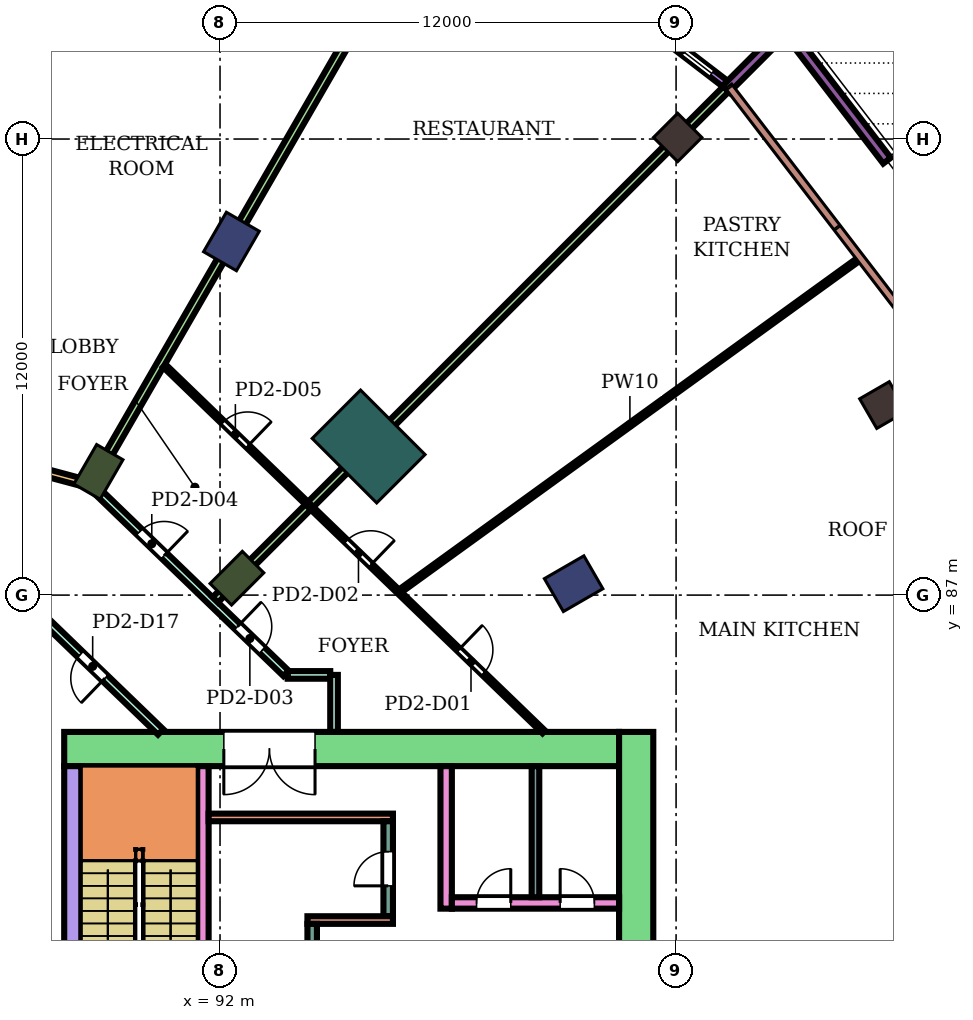
"""IFC4 building model, lengths in metres.
Left out: names, types, materials, properties, quantities, classifications, styles, units other than length and angle.
Written with IfcOpenShell. Run it as: python <this file> out.ifc"""

import sys

from ifc_helpers import new_model, si_unit, direction, frame, frame_2d, origin, origin_2d, place, context, subcontext, project, spatial, rectangle, extrude, element, fill, save


model = new_model("IFC4")
c1 = context("Model", 3, precision=1e-05, world=origin(), true_north=direction((0.0, 1.0)))
c2 = subcontext(c1, "Body", "Model", "MODEL_VIEW")
j1 = project(units=[si_unit("LENGTHUNIT", "METRE"), si_unit("PLANEANGLEUNIT", "RADIAN")], contexts=[c1])
p1 = place(None, origin())
s1 = spatial("IfcSite", under=j1, at=p1, CompositionType="ELEMENT")
p2 = place(p1, origin())
s2 = spatial("IfcBuilding", under=s1, at=p2, CompositionType="ELEMENT")
p3 = place(p2, frame((0.0, 0.0, 12.4)))
s3 = spatial("IfcBuildingStorey", under=s2, at=p3, CompositionType="ELEMENT", Elevation=12.4)
for number, where, z_axis, x_axis in (
    (1, (109.445, 92.0, 0.0), (0.0, 0.0, 1.0), (0.866, 0.5, 0.0)),
    (2, (104.042, 99.042, 0.0), (0.0, 0.0, 1.0), (0.707, 0.707, 0.0)),
):
    element("IfcColumn", number, at=place(p3, frame(where, z_axis=z_axis, x_axis=x_axis)), inside=s3, PredefinedType="COLUMN", context=c2, shape_type="SweptSolid", body=[
        extrude(rectangle(XDim=0.9, YDim=0.9, at=origin_2d()), origin(), (0.0, 0.0, 1.0), 5.4),
    ])
for number, where, z_axis, x_axis in (
    (3, (101.304, 87.3, 0.0), (0.0, 0.0, 1.0), (0.866, 0.5, 0.0)),
    (4, (92.3, 96.304, 0.0), (0.0, 0.0, 1.0), (0.5, 0.866, 0.0)),
):
    element("IfcColumn", number, at=place(p3, frame(where, z_axis=z_axis, x_axis=x_axis)), inside=s3, PredefinedType="COLUMN", context=c2, shape_type="SweptSolid", body=[
        extrude(rectangle(XDim=1.2, YDim=1.0, at=origin_2d()), origin(), (0.0, 0.0, 1.0), 5.4),
    ])
for number, where, z_axis, x_axis in (
    (5, (92.445, 87.445, 0.0), (0.0, 0.0, 1.0), (0.707, 0.707, 0.0)),
    (6, (88.8, 90.242, 0.0), (0.0, 0.0, 1.0), (0.5, 0.866, 0.0)),
):
    element("IfcColumn", number, at=place(p3, frame(where, z_axis=z_axis, x_axis=x_axis)), inside=s3, PredefinedType="COLUMN", context=c2, shape_type="SweptSolid", body=[
        extrude(rectangle(XDim=1.2, YDim=0.8, at=origin_2d()), origin(), (0.0, 0.0, 1.0), 5.4),
    ])
p4 = place(p3, frame((95.91, 90.91, 0.0), z_axis=(0.0, 0.0, 1.0), x_axis=(0.707106781187, 0.707106781187, 0.0)))
e7 = element("IfcColumn", 7, at=p4, inside=s3, PredefinedType="COLUMN", context=c2, shape_type="SweptSolid", body=[
    extrude(rectangle(XDim=1.8, YDim=2.4, at=origin_2d()), origin(), (0.0, 0.0, 1.0), 5.4),
])
p5 = place(p3, frame((87.9, 82.95, 0.0), z_axis=(0.0, 0.0, 1.0), x_axis=(1.0, 0.0, 0.0)))
e8 = element("IfcWall", 8, at=p5, inside=s3, PredefinedType="SHEAR", context=c2, shape_type="SweptSolid", body=[
    extrude(rectangle(XDim=14.6, YDim=0.9, at=frame_2d((7.3, 0.0))), origin(), (0.0, 0.0, 1.0), 4.95),
])
p6 = place(p5, frame((4.2, 0.0, 0.0)))
e9 = element("IfcOpeningElement", 9, at=p6, cuts=e8, PredefinedType="OPENING", context=c2, shape_type="SweptSolid", body=[
    extrude(rectangle(XDim=2.4, YDim=2.4, at=frame_2d((1.2, 1.2))), frame((0.0, 0.46, 0.0), z_axis=(0.0, -1.0, 0.0), x_axis=(1.0, 0.0, 0.0)), (0.0, 0.0, 1.0), 0.92),
])
p7 = place(p3, frame((88.125, 75.0, 0.0), z_axis=(0.0, 0.0, 1.0), x_axis=(0.0, 1.0, 0.0)))
e10 = element("IfcWall", 10, at=p7, inside=s3, PredefinedType="SHEAR", context=c2, shape_type="SweptSolid", body=[
    extrude(rectangle(XDim=7.5, YDim=0.45, at=frame_2d((3.75, 0.0))), origin(), (0.0, 0.0, 1.0), 4.95),
])
p8 = place(p3, frame((102.95, 66.6, 0.0), z_axis=(0.0, 0.0, 1.0), x_axis=(0.0, 1.0, 0.0)))
e11 = element("IfcWall", 11, at=p8, inside=s3, PredefinedType="SHEAR", context=c2, shape_type="SweptSolid", body=[
    extrude(rectangle(XDim=16.8, YDim=0.9, at=frame_2d((8.4, 0.0))), origin(), (0.0, 0.0, 1.0), 4.95),
])
p9 = place(p3, frame((91.55, 75.0, 0.0), z_axis=(0.0, 0.0, 1.0), x_axis=(0.0, 1.0, 0.0)))
e12 = element("IfcWall", 12, at=p9, inside=s3, PredefinedType="SHEAR", context=c2, shape_type="SweptSolid", body=[
    extrude(rectangle(XDim=7.5, YDim=0.3, at=frame_2d((3.75, 0.0))), origin(), (0.0, 0.0, 1.0), 4.95),
])
p10 = place(p9, frame((1.85, 0.0, 0.0)))
e13 = element("IfcOpeningElement", 13, at=p10, cuts=e12, PredefinedType="OPENING", context=c2, shape_type="SweptSolid", body=[
    extrude(rectangle(XDim=0.9, YDim=2.1, at=frame_2d((0.45, 1.05))), frame((0.0, 0.16, 0.0), z_axis=(0.0, -1.0, 0.0), x_axis=(1.0, 0.0, 0.0)), (0.0, 0.0, 1.0), 0.32),
])
p11 = place(p3, frame((91.7, 81.15, 0.0), z_axis=(0.0, 0.0, 1.0), x_axis=(1.0, 0.0, 0.0)))
e14 = element("IfcWall", 14, at=p11, inside=s3, PredefinedType="SHEAR", context=c2, shape_type="SweptSolid", body=[
    extrude(rectangle(XDim=4.85, YDim=0.2, at=frame_2d((2.425, 0.0))), origin(), (0.0, 0.0, 1.0), 4.95),
])
p12 = place(p3, frame((96.425, 78.55, 0.0), z_axis=(0.0, 0.0, 1.0), x_axis=(0.0, 1.0, 0.0)))
e15 = element("IfcWall", 15, at=p12, inside=s3, PredefinedType="SHEAR", context=c2, shape_type="SweptSolid", body=[
    extrude(rectangle(XDim=2.5, YDim=0.25, at=frame_2d((1.25, 0.0))), origin(), (0.0, 0.0, 1.0), 4.95),
])
p13 = place(p12, frame((0.8, 0.0, 0.0)))
e16 = element("IfcOpeningElement", 16, at=p13, cuts=e15, PredefinedType="OPENING", context=c2, shape_type="SweptSolid", body=[
    extrude(rectangle(XDim=0.9, YDim=2.1, at=frame_2d((0.45, 1.05))), frame((0.0, 0.135, 0.0), z_axis=(0.0, -1.0, 0.0), x_axis=(1.0, 0.0, 0.0)), (0.0, 0.0, 1.0), 0.27),
])
p14 = place(p3, frame((94.3, 78.45, 0.0), z_axis=(0.0, 0.0, 1.0), x_axis=(1.0, 0.0, 0.0)))
e17 = element("IfcWall", 17, at=p14, inside=s3, PredefinedType="SHEAR", context=c2, shape_type="SweptSolid", body=[
    extrude(rectangle(XDim=2.25, YDim=0.2, at=frame_2d((1.125, 0.0))), origin(), (0.0, 0.0, 1.0), 4.95),
])
p15 = place(p3, frame((94.425, 76.85, 0.0), z_axis=(0.0, 0.0, 1.0), x_axis=(0.0, 1.0, 0.0)))
e18 = element("IfcWall", 18, at=p15, inside=s3, PredefinedType="SHEAR", context=c2, shape_type="SweptSolid", body=[
    extrude(rectangle(XDim=1.5, YDim=0.25, at=frame_2d((0.75, 0.0))), origin(), (0.0, 0.0, 1.0), 4.95),
])
p16 = place(p3, frame((97.95, 78.75, 0.0), z_axis=(0.0, 0.0, 1.0), x_axis=(0.0, 1.0, 0.0)))
e19 = element("IfcWall", 19, at=p16, inside=s3, PredefinedType="SHEAR", context=c2, shape_type="SweptSolid", body=[
    extrude(rectangle(XDim=3.75, YDim=0.3, at=frame_2d((1.875, 0.0))), origin(), (0.0, 0.0, 1.0), 4.95),
])
p17 = place(p3, frame((98.1, 78.9, 0.0), z_axis=(0.0, 0.0, 1.0), x_axis=(1.0, 0.0, 0.0)))
e20 = element("IfcWall", 20, at=p17, inside=s3, PredefinedType="SHEAR", context=c2, shape_type="SweptSolid", body=[
    extrude(rectangle(XDim=4.4, YDim=0.3, at=frame_2d((2.2, 0.0))), origin(), (0.0, 0.0, 1.0), 4.95),
])
p18 = place(p17, frame((0.65, 0.0, 0.0)))
e21 = element("IfcOpeningElement", 21, at=p18, cuts=e20, PredefinedType="OPENING", context=c2, shape_type="SweptSolid", body=[
    extrude(rectangle(XDim=0.9, YDim=2.1, at=frame_2d((0.45, 1.05))), frame((0.0, 0.16, 0.0), z_axis=(0.0, -1.0, 0.0), x_axis=(1.0, 0.0, 0.0)), (0.0, 0.0, 1.0), 0.32),
])
p19 = place(p17, frame((2.85, 0.0, 0.0)))
e22 = element("IfcOpeningElement", 22, at=p19, cuts=e20, PredefinedType="OPENING", context=c2, shape_type="SweptSolid", body=[
    extrude(rectangle(XDim=0.9, YDim=2.1, at=frame_2d((0.45, 1.05))), frame((0.0, 0.16, 0.0), z_axis=(0.0, -1.0, 0.0), x_axis=(1.0, 0.0, 0.0)), (0.0, 0.0, 1.0), 0.32),
])
p20 = place(p3, frame((105.385, 100.385, 0.0), z_axis=(0.0, 0.0, 1.0), x_axis=(-0.793355555811, 0.608758541676, 0.0)))
e23 = element("IfcWall", 23, at=p20, inside=s3, PredefinedType="NOTDEFINED", context=c2, shape_type="SweptSolid", body=[
    extrude(rectangle(XDim=9.372, YDim=0.2, at=frame_2d((4.686, 0.0))), origin(), (0.0, 0.0, 1.0), 5.4),
])
p21 = place(p20, frame((0.562, 0.0, 0.9)))
e24 = element("IfcOpeningElement", 24, at=p21, cuts=e23, PredefinedType="OPENING", context=c2, shape_type="SweptSolid", body=[
    extrude(rectangle(XDim=2.0, YDim=2.4, at=frame_2d((1.0, 1.2))), frame((0.0, 0.11, 0.0), z_axis=(0.0, -1.0, 0.0), x_axis=(1.0, 0.0, 0.0)), (0.0, 0.0, 1.0), 0.22),
])
p22 = place(p20, frame((3.786, 0.0, 0.0)))
e25 = element("IfcOpeningElement", 25, at=p22, cuts=e23, PredefinedType="OPENING", context=c2, shape_type="SweptSolid", body=[
    extrude(rectangle(XDim=1.8, YDim=2.4, at=frame_2d((0.9, 1.2))), frame((0.0, 0.11, 0.0), z_axis=(0.0, -1.0, 0.0), x_axis=(1.0, 0.0, 0.0)), (0.0, 0.0, 1.0), 0.22),
])
p23 = place(p20, frame((6.81, 0.0, 0.9)))
e26 = element("IfcOpeningElement", 26, at=p23, cuts=e23, PredefinedType="OPENING", context=c2, shape_type="SweptSolid", body=[
    extrude(rectangle(XDim=2.0, YDim=2.4, at=frame_2d((1.0, 1.2))), frame((0.0, 0.11, 0.0), z_axis=(0.0, -1.0, 0.0), x_axis=(1.0, 0.0, 0.0)), (0.0, 0.0, 1.0), 0.22),
])
p24 = place(p3, frame((87.604, 75.0, 0.0), z_axis=(0.0, 0.0, 1.0), x_axis=(-0.258789828301, 0.965933654434, 0.0)))
e27 = element("IfcWall", 27, at=p24, inside=s3, PredefinedType="NOTDEFINED", context=c2, shape_type="SweptSolid", body=[
    extrude(rectangle(XDim=3.936, YDim=0.2, at=frame_2d((1.968, 0.0))), origin(), (0.0, 0.0, 1.0), 5.4),
])
p25 = place(p24, frame((0.468, 0.0, 0.9)))
e28 = element("IfcOpeningElement", 28, at=p25, cuts=e27, PredefinedType="OPENING", context=c2, shape_type="SweptSolid", body=[
    extrude(rectangle(XDim=3.0, YDim=2.3, at=frame_2d((1.5, 1.15))), frame((0.0, 0.11, 0.0), z_axis=(0.0, -1.0, 0.0), x_axis=(1.0, 0.0, 0.0)), (0.0, 0.0, 1.0), 0.22),
])
p26 = place(p3, frame((108.785, 103.767, 0.0), z_axis=(0.0, 0.0, 1.0), x_axis=(0.608761803977, -0.793353052568, 0.0)))
e29 = element("IfcWall", 29, at=p26, inside=s3, PredefinedType="PARAPET", context=c2, shape_type="SweptSolid", body=[
    extrude(rectangle(XDim=10.598, YDim=0.2, at=frame_2d((5.299, 0.0))), origin(), (0.0, 0.0, 1.0), 1.1),
])
p27 = place(p3, frame((106.893, 101.893, 0.0), z_axis=(0.0, 0.0, 1.0), x_axis=(0.608753283374, -0.79335959059, 0.0)))
e30 = element("IfcWall", 30, at=p27, inside=s3, PredefinedType="USERDEFINED", context=c2, shape_type="SweptSolid", body=[
    extrude(rectangle(XDim=4.364, YDim=0.25, at=frame_2d((2.182, 0.0))), origin(), (0.0, 0.0, 1.0), 0.6),
])
p28 = place(p3, frame((106.792, 101.792, 0.0), z_axis=(0.0, 0.0, 1.0), x_axis=(-0.707106781187, -0.707106781187, 0.0)))
e31 = element("IfcWall", 31, at=p28, inside=s3, PredefinedType="USERDEFINED", context=c2, shape_type="SweptSolid", body=[
    extrude(rectangle(XDim=2.092, YDim=0.25, at=frame_2d((1.046, 0.0))), origin(), (0.0, 0.0, 1.0), 0.6),
])
p29 = place(p3, frame((80.0, 92.21, 0.0), z_axis=(0.0, 0.0, 1.0), x_axis=(0.965910452724, -0.258876413213, 0.0)))
e32 = element("IfcWall", 32, at=p29, inside=s3, PredefinedType="PARTITIONING", context=c2, shape_type="SweptSolid", body=[
    extrude(rectangle(XDim=8.812, YDim=0.2, at=frame_2d((4.406, 0.0))), origin(), (0.0, 0.0, 1.0), 4.45),
])
p30 = place(p29, frame((6.213, 0.0, 0.0)))
e33 = element("IfcOpeningElement", 33, at=p30, cuts=e32, PredefinedType="OPENING", context=c2, shape_type="SweptSolid", body=[
    extrude(rectangle(XDim=0.9, YDim=2.1, at=frame_2d((0.45, 1.05))), frame((0.0, 0.11, 0.0), z_axis=(0.0, -1.0, 0.0), x_axis=(1.0, 0.0, 0.0)), (0.0, 0.0, 1.0), 0.22),
])
p31 = place(p29, frame((1.787, 0.0, 0.0)))
e34 = element("IfcOpeningElement", 34, at=p31, cuts=e32, PredefinedType="OPENING", context=c2, shape_type="SweptSolid", body=[
    extrude(rectangle(XDim=0.9, YDim=2.1, at=frame_2d((0.45, 1.05))), frame((0.0, 0.11, 0.0), z_axis=(0.0, -1.0, 0.0), x_axis=(1.0, 0.0, 0.0)), (0.0, 0.0, 1.0), 0.22),
])
p32 = place(p3, frame((84.329, 91.153, 0.0), z_axis=(0.0, 0.0, 1.0), x_axis=(0.258913936043, 0.965900395343, 0.0)))
e35 = element("IfcWall", 35, at=p32, inside=s3, PredefinedType="PARTITIONING", context=c2, shape_type="SweptSolid", body=[
    extrude(rectangle(XDim=19.075, YDim=0.2, at=frame_2d((9.537, 0.0))), origin(), (0.0, 0.0, 1.0), 3.75),
])
p33 = place(p3, frame((86.861, 86.852, 0.0), z_axis=(0.0, 0.0, 1.0), x_axis=(0.719448855188, -0.694545423114, 0.0)))
e36 = element("IfcWall", 36, at=p33, inside=s3, PredefinedType="PARTITIONING", context=c2, shape_type="SweptSolid", body=[
    extrude(rectangle(XDim=4.97, YDim=0.2, at=frame_2d((2.485, 0.0))), origin(), (0.0, 0.0, 1.0), 4.95),
])
p34 = place(p33, frame((2.035, 0.0, 0.0)))
e37 = element("IfcOpeningElement", 37, at=p34, cuts=e36, PredefinedType="OPENING", context=c2, shape_type="SweptSolid", body=[
    extrude(rectangle(XDim=0.9, YDim=2.1, at=frame_2d((0.45, 1.05))), frame((0.0, 0.11, 0.0), z_axis=(0.0, -1.0, 0.0), x_axis=(1.0, 0.0, 0.0)), (0.0, 0.0, 1.0), 0.22),
])
p35 = place(p3, frame((88.668, 89.832, 0.0), z_axis=(0.0, 0.0, 1.0), x_axis=(0.71956091863, -0.694429322811, 0.0)))
e38 = element("IfcWall", 38, at=p35, inside=s3, PredefinedType="PARTITIONING", context=c2, shape_type="SweptSolid", body=[
    extrude(rectangle(XDim=7.043, YDim=0.2, at=frame_2d((3.521, 0.0))), origin(), (0.0, 0.0, 1.0), 4.95),
])
p36 = place(p35, frame((5.271, 0.0, 0.0)))
e39 = element("IfcOpeningElement", 39, at=p36, cuts=e38, PredefinedType="OPENING", context=c2, shape_type="SweptSolid", body=[
    extrude(rectangle(XDim=0.9, YDim=2.1, at=frame_2d((0.45, 1.05))), frame((0.0, 0.11, 0.0), z_axis=(0.0, -1.0, 0.0), x_axis=(1.0, 0.0, 0.0)), (0.0, 0.0, 1.0), 0.22),
])
p37 = place(p35, frame((1.684, 0.0, 0.0)))
e40 = element("IfcOpeningElement", 40, at=p37, cuts=e38, PredefinedType="OPENING", context=c2, shape_type="SweptSolid", body=[
    extrude(rectangle(XDim=0.9, YDim=2.1, at=frame_2d((0.45, 1.05))), frame((0.0, 0.11, 0.0), z_axis=(0.0, -1.0, 0.0), x_axis=(1.0, 0.0, 0.0)), (0.0, 0.0, 1.0), 0.22),
])
p38 = place(p3, frame((88.602, 89.897, 0.0), z_axis=(0.0, 0.0, 1.0), x_axis=(0.50004595028, 0.865998872752, 0.0)))
e41 = element("IfcWall", 41, at=p38, inside=s3, PredefinedType="PARTITIONING", context=c2, shape_type="SweptSolid", body=[
    extrude(rectangle(XDim=18.596, YDim=0.2, at=frame_2d((9.298, 0.0))), origin(), (0.0, 0.0, 1.0), 3.75),
])
p39 = place(p3, frame((91.876, 86.876, 0.0), z_axis=(0.0, 0.0, 1.0), x_axis=(0.707106781187, 0.707106781187, 0.0)))
e42 = element("IfcWall", 42, at=p39, inside=s3, PredefinedType="PARTITIONING", context=c2, shape_type="SweptSolid", body=[
    extrude(rectangle(XDim=19.004, YDim=0.2, at=frame_2d((9.502, 0.0))), origin(), (0.0, 0.0, 1.0), 3.75),
])
p40 = place(p3, frame((93.78, 84.9, 0.0), z_axis=(0.0, 0.0, 1.0), x_axis=(1.0, 0.0, 0.0)))
e43 = element("IfcWall", 43, at=p40, inside=s3, PredefinedType="PARTITIONING", context=c2, shape_type="SweptSolid", body=[
    extrude(rectangle(XDim=1.12, YDim=0.2, at=frame_2d((0.56, 0.0))), origin(), (0.0, 0.0, 1.0), 4.95),
])
p41 = place(p3, frame((95.0, 83.401, 0.0), z_axis=(0.0, 0.0, 1.0), x_axis=(0.0, 1.0, 0.0)))
e44 = element("IfcWall", 44, at=p41, inside=s3, PredefinedType="PARTITIONING", context=c2, shape_type="SweptSolid", body=[
    extrude(rectangle(XDim=1.499, YDim=0.2, at=frame_2d((0.75, 0.0))), origin(), (0.0, 0.0, 1.0), 4.95),
])
p42 = place(p3, frame((90.536, 93.034, 0.0), z_axis=(0.0, 0.0, 1.0), x_axis=(0.719550314706, -0.694440310327, 0.0)))
e45 = element("IfcWall", 45, at=p42, inside=s3, PredefinedType="PARTITIONING", context=c2, shape_type="SweptSolid", body=[
    extrude(rectangle(XDim=13.875, YDim=0.1, at=frame_2d((6.937, 0.0))), origin(), (0.0, 0.0, 1.0), 4.95),
])
p43 = place(p42, frame((10.763, 0.0, 0.0)))
e46 = element("IfcOpeningElement", 46, at=p43, cuts=e45, PredefinedType="OPENING", context=c2, shape_type="SweptSolid", body=[
    extrude(rectangle(XDim=0.9, YDim=2.1, at=frame_2d((0.45, 1.05))), frame((0.0, 0.06, 0.0), z_axis=(0.0, -1.0, 0.0), x_axis=(1.0, 0.0, 0.0)), (0.0, 0.0, 1.0), 0.12),
])
p44 = place(p42, frame((6.648, 0.0, 0.0)))
e47 = element("IfcOpeningElement", 47, at=p44, cuts=e45, PredefinedType="OPENING", context=c2, shape_type="SweptSolid", body=[
    extrude(rectangle(XDim=0.9, YDim=2.1, at=frame_2d((0.45, 1.05))), frame((0.0, 0.06, 0.0), z_axis=(0.0, -1.0, 0.0), x_axis=(1.0, 0.0, 0.0)), (0.0, 0.0, 1.0), 0.12),
])
p45 = place(p42, frame((2.146, 0.0, 0.0)))
e48 = element("IfcOpeningElement", 48, at=p45, cuts=e45, PredefinedType="OPENING", context=c2, shape_type="SweptSolid", body=[
    extrude(rectangle(XDim=0.9, YDim=2.1, at=frame_2d((0.45, 1.05))), frame((0.0, 0.06, 0.0), z_axis=(0.0, -1.0, 0.0), x_axis=(1.0, 0.0, 0.0)), (0.0, 0.0, 1.0), 0.12),
])
p46 = place(p3, frame((96.752, 87.118, 0.0), z_axis=(0.0, 0.0, 1.0), x_axis=(0.810241473642, 0.586096198921, 0.0)))
e49 = element("IfcWall", 49, at=p46, inside=s3, PredefinedType="PARTITIONING", context=c2, shape_type="SweptSolid", body=[
    extrude(rectangle(XDim=14.891, YDim=0.1, at=frame_2d((7.445, 0.0))), origin(), (0.0, 0.0, 1.0), 4.95),
])
p47 = place(p3, frame((100.3, 79.05, 0.0), z_axis=(0.0, 0.0, 1.0), x_axis=(0.0, 1.0, 0.0)))
e50 = element("IfcWall", 50, at=p47, inside=s3, PredefinedType="PARTITIONING", context=c2, shape_type="SweptSolid", body=[
    extrude(rectangle(XDim=3.45, YDim=0.2, at=frame_2d((1.725, 0.0))), origin(), (0.0, 0.0, 1.0), 4.95),
])
p48 = place(p21, origin())
e51 = element("IfcWindow", 51, at=p48, inside=s3, PartitioningType="SINGLE_PANEL", PredefinedType="WINDOW", context=c2, shape_type="SweptSolid", body=[
    extrude(rectangle(XDim=2.0, YDim=2.4, at=frame_2d((1.0, 1.2))), frame((0.0, 0.03, 0.0), z_axis=(0.0, -1.0, 0.0), x_axis=(1.0, 0.0, 0.0)), (0.0, 0.0, 1.0), 0.06),
])
fill(e24, e51)
p49 = place(p43, origin())
e52 = element("IfcDoor", 52, at=p49, inside=s3, OperationType="SINGLE_SWING_LEFT", PredefinedType="DOOR", context=c2, shape_type="SweptSolid", body=[
    extrude(rectangle(XDim=0.9, YDim=2.1, at=frame_2d((0.45, 1.05))), frame((0.0, 0.025, 0.0), z_axis=(0.0, -1.0, 0.0), x_axis=(1.0, 0.0, 0.0)), (0.0, 0.0, 1.0), 0.05),
])
fill(e46, e52)
p50 = place(p44, origin())
e53 = element("IfcDoor", 53, at=p50, inside=s3, OperationType="SINGLE_SWING_RIGHT", PredefinedType="DOOR", context=c2, shape_type="SweptSolid", body=[
    extrude(rectangle(XDim=0.9, YDim=2.1, at=frame_2d((0.45, 1.05))), frame((0.0, 0.025, 0.0), z_axis=(0.0, -1.0, 0.0), x_axis=(1.0, 0.0, 0.0)), (0.0, 0.0, 1.0), 0.05),
])
fill(e47, e53)
p51 = place(p36, origin())
e54 = element("IfcDoor", 54, at=p51, inside=s3, OperationType="SINGLE_SWING_LEFT", PredefinedType="DOOR", context=c2, shape_type="SweptSolid", body=[
    extrude(rectangle(XDim=0.9, YDim=2.1, at=frame_2d((0.45, 1.05))), frame((0.0, 0.025, 0.0), z_axis=(0.0, -1.0, 0.0), x_axis=(1.0, 0.0, 0.0)), (0.0, 0.0, 1.0), 0.05),
])
fill(e39, e54)
p52 = place(p37, origin())
e55 = element("IfcDoor", 55, at=p52, inside=s3, OperationType="SINGLE_SWING_RIGHT", PredefinedType="DOOR", context=c2, shape_type="SweptSolid", body=[
    extrude(rectangle(XDim=0.9, YDim=2.1, at=frame_2d((0.45, 1.05))), frame((0.0, 0.025, 0.0), z_axis=(0.0, -1.0, 0.0), x_axis=(1.0, 0.0, 0.0)), (0.0, 0.0, 1.0), 0.05),
])
fill(e40, e55)
p53 = place(p45, origin())
e56 = element("IfcDoor", 56, at=p53, inside=s3, OperationType="SINGLE_SWING_RIGHT", PredefinedType="DOOR", context=c2, shape_type="SweptSolid", body=[
    extrude(rectangle(XDim=0.9, YDim=2.1, at=frame_2d((0.45, 1.05))), frame((0.0, 0.025, 0.0), z_axis=(0.0, -1.0, 0.0), x_axis=(1.0, 0.0, 0.0)), (0.0, 0.0, 1.0), 0.05),
])
fill(e48, e56)
p54 = place(p34, frame((0.9, 0.0, 0.0), z_axis=(0.0, 0.0, 1.0), x_axis=(-1.0, 0.0, 0.0)))
e57 = element("IfcDoor", 57, at=p54, inside=s3, OperationType="SINGLE_SWING_LEFT", PredefinedType="DOOR", context=c2, shape_type="SweptSolid", body=[
    extrude(rectangle(XDim=0.9, YDim=2.1, at=frame_2d((0.45, 1.05))), frame((0.0, 0.025, 0.0), z_axis=(0.0, -1.0, 0.0), x_axis=(1.0, 0.0, 0.0)), (0.0, 0.0, 1.0), 0.05),
])
fill(e37, e57)
p55 = place(p13, origin())
e58 = element("IfcDoor", 58, at=p55, inside=s3, OperationType="SINGLE_SWING_LEFT", PredefinedType="DOOR", context=c2, shape_type="SweptSolid", body=[
    extrude(rectangle(XDim=0.9, YDim=2.1, at=frame_2d((0.45, 1.05))), frame((0.0, 0.025, 0.0), z_axis=(0.0, -1.0, 0.0), x_axis=(1.0, 0.0, 0.0)), (0.0, 0.0, 1.0), 0.05),
])
fill(e16, e58)
p56 = place(p18, origin())
e59 = element("IfcDoor", 59, at=p56, inside=s3, OperationType="SINGLE_SWING_RIGHT", PredefinedType="DOOR", context=c2, shape_type="SweptSolid", body=[
    extrude(rectangle(XDim=0.9, YDim=2.1, at=frame_2d((0.45, 1.05))), frame((0.0, 0.025, 0.0), z_axis=(0.0, -1.0, 0.0), x_axis=(1.0, 0.0, 0.0)), (0.0, 0.0, 1.0), 0.05),
])
fill(e21, e59)
p57 = place(p19, origin())
e60 = element("IfcDoor", 60, at=p57, inside=s3, OperationType="SINGLE_SWING_LEFT", PredefinedType="DOOR", context=c2, shape_type="SweptSolid", body=[
    extrude(rectangle(XDim=0.9, YDim=2.1, at=frame_2d((0.45, 1.05))), frame((0.0, 0.025, 0.0), z_axis=(0.0, -1.0, 0.0), x_axis=(1.0, 0.0, 0.0)), (0.0, 0.0, 1.0), 0.05),
])
fill(e22, e60)
p58 = place(p6, frame((2.4, 0.0, 0.0), z_axis=(0.0, 0.0, 1.0), x_axis=(-1.0, 0.0, 0.0)))
e61 = element("IfcDoor", 61, at=p58, inside=s3, OperationType="DOUBLE_DOOR_SINGLE_SWING", PredefinedType="DOOR", context=c2, shape_type="SweptSolid", body=[
    extrude(rectangle(XDim=2.4, YDim=2.4, at=frame_2d((1.2, 1.2))), frame((0.0, 0.025, 0.0), z_axis=(0.0, -1.0, 0.0), x_axis=(1.0, 0.0, 0.0)), (0.0, 0.0, 1.0), 0.05),
])
fill(e9, e61)
save(model, sys.argv[1])
